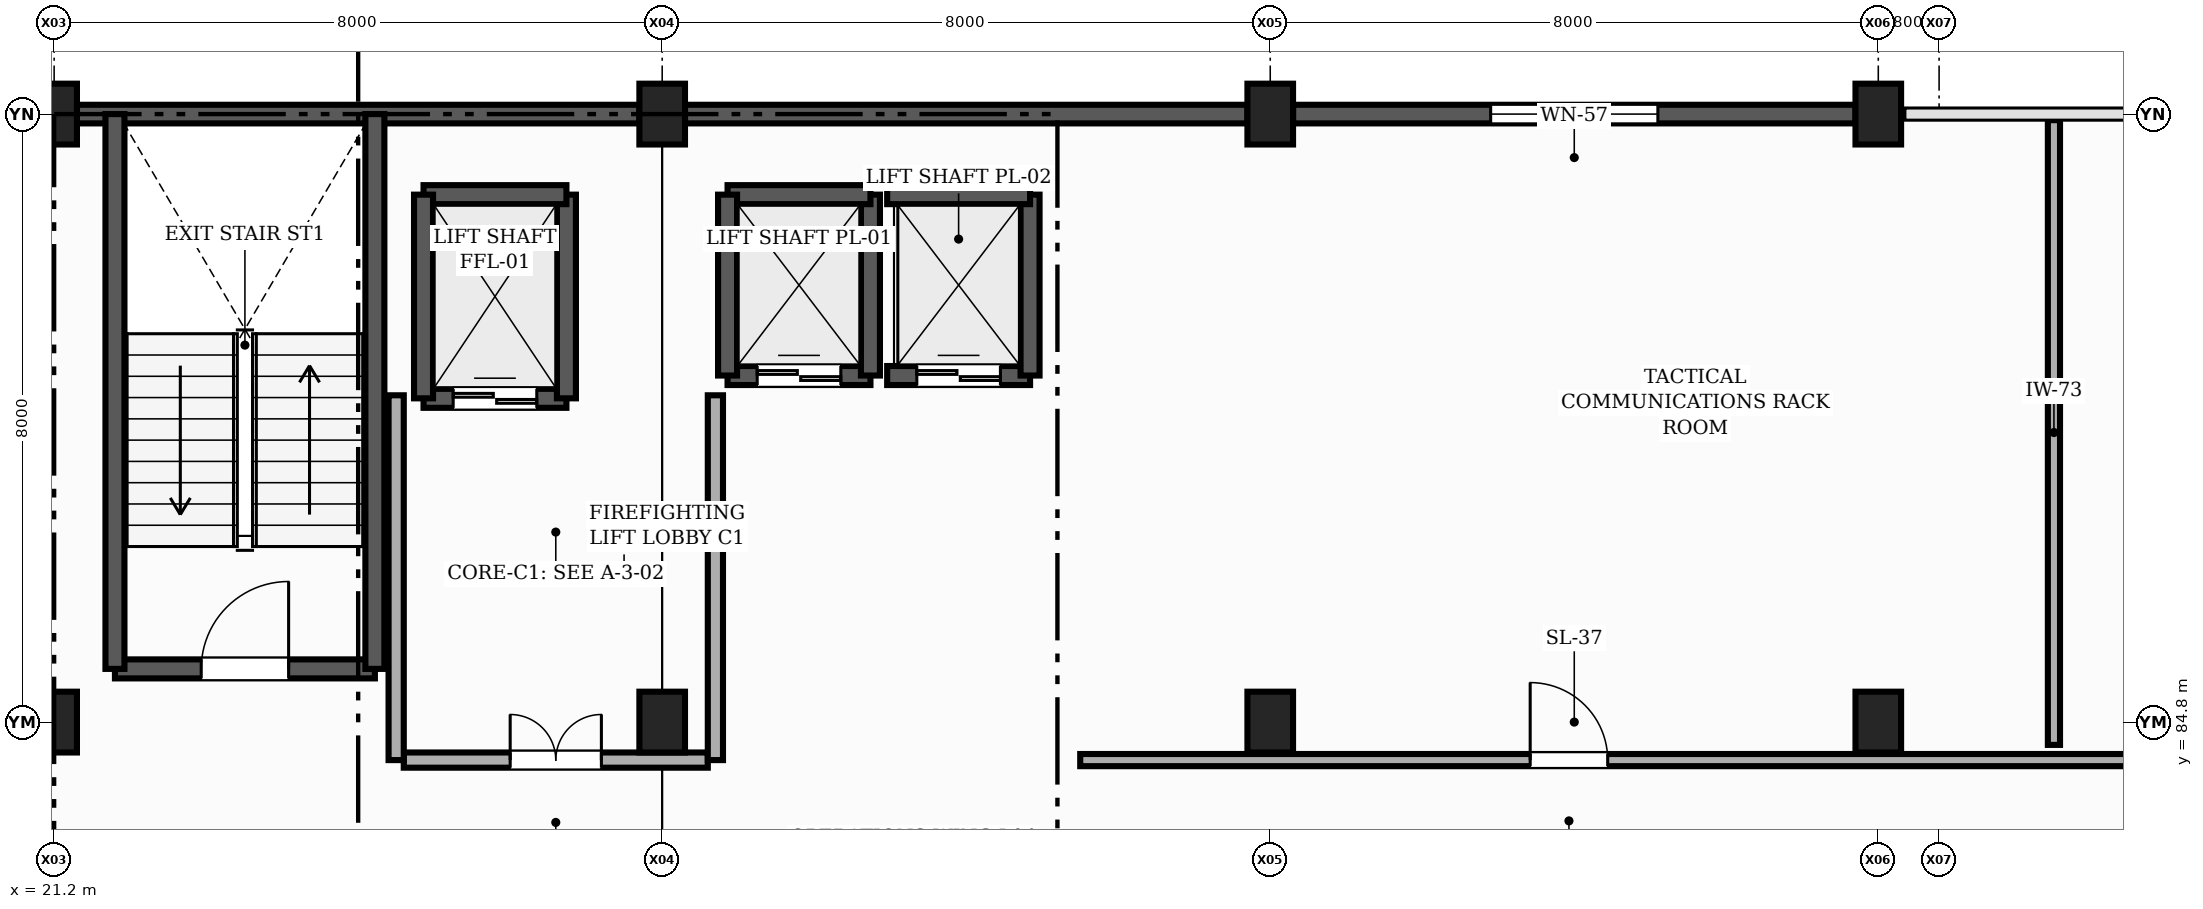
"""IFC4 building model, lengths in metres.
Left out: names, types, materials, properties, quantities, classifications, styles, units other than length and angle.
Written with IfcOpenShell. Run it as: python <this file> out.ifc"""

import sys

from ifc_helpers import new_model, si_unit, direction, frame, frame_2d, origin, origin_2d, place, context, subcontext, project, spatial, rectangle, extrude, element, fill, save


model = new_model("IFC4")
c1 = context("Model", 3, precision=1e-05, world=origin(), true_north=direction((0.0, 1.0)))
c2 = subcontext(c1, "Body", "Model", "MODEL_VIEW")
j1 = project(units=[si_unit("LENGTHUNIT", "METRE"), si_unit("PLANEANGLEUNIT", "RADIAN")], contexts=[c1])
p1 = place(None, origin())
s1 = spatial("IfcSite", under=j1, at=p1, CompositionType="ELEMENT")
p2 = place(p1, origin())
s2 = spatial("IfcBuilding", under=s1, at=p2, CompositionType="ELEMENT")
p3 = place(p2, frame((0.0, 0.0, 18.0)))
s3 = spatial("IfcBuildingStorey", under=s2, at=p3, CompositionType="ELEMENT", Elevation=18.0)
for number, where, z_axis, x_axis in (
    (1, (21.2, 84.8, 0.0), (0.0, 0.0, 1.0), (1.0, 0.0, 0.0)),
    (2, (21.2, 92.8, 0.0), (0.0, 0.0, 1.0), (1.0, 0.0, 0.0)),
    (3, (29.2, 84.8, 0.0), (0.0, 0.0, 1.0), (1.0, 0.0, 0.0)),
    (4, (29.2, 92.8, 0.0), (0.0, 0.0, 1.0), (1.0, 0.0, 0.0)),
    (5, (37.2, 84.8, 0.0), (0.0, 0.0, 1.0), (1.0, 0.0, 0.0)),
    (6, (37.2, 92.8, 0.0), (0.0, 0.0, 1.0), (1.0, 0.0, 0.0)),
    (7, (45.2, 84.8, 0.0), (0.0, 0.0, 1.0), (1.0, 0.0, 0.0)),
    (8, (45.2, 92.8, 0.0), (0.0, 0.0, 1.0), (1.0, 0.0, 0.0)),
):
    element("IfcColumn", number, at=place(p3, frame(where, z_axis=z_axis, x_axis=x_axis)), inside=s3, PredefinedType="COLUMN", context=c2, shape_type="SweptSolid", body=[
        extrude(rectangle(XDim=0.6, YDim=0.8, at=origin_2d()), origin(), (0.0, 0.0, 1.0), 3.9),
    ])
p4 = place(p3, frame((44.9, 92.8, 0.0), z_axis=(0.0, 0.0, 1.0), x_axis=(-1.0, 0.0, 0.0)))
e9 = element("IfcWall", 9, at=p4, inside=s3, PredefinedType="SOLIDWALL", context=c2, shape_type="SweptSolid", body=[
    extrude(rectangle(XDim=7.4, YDim=0.245, at=frame_2d((3.7, 0.0))), origin(), (0.0, 0.0, 1.0), 2.99),
])
p5 = place(p4, frame((2.6, 0.0, 0.9)))
e10 = element("IfcOpeningElement", 10, at=p5, cuts=e9, PredefinedType="OPENING", context=c2, shape_type="SweptSolid", body=[
    extrude(rectangle(XDim=2.2, YDim=1.6, at=frame_2d((1.1, 0.8))), frame((0.0, 0.133, 0.0), z_axis=(0.0, -1.0, 0.0), x_axis=(1.0, 0.0, 0.0)), (0.0, 0.0, 1.0), 0.265),
])
p6 = place(p3, frame((36.9, 92.8, 0.0), z_axis=(0.0, 0.0, 1.0), x_axis=(-1.0, 0.0, 0.0)))
e11 = element("IfcWall", 11, at=p6, inside=s3, PredefinedType="SOLIDWALL", context=c2, shape_type="SweptSolid", body=[
    extrude(rectangle(XDim=7.4, YDim=0.245, at=frame_2d((3.7, 0.0))), origin(), (0.0, 0.0, 1.0), 2.99),
])
p7 = place(p3, frame((28.9, 92.8, 0.0), z_axis=(0.0, 0.0, 1.0), x_axis=(-1.0, 0.0, 0.0)))
e12 = element("IfcWall", 12, at=p7, inside=s3, PredefinedType="SOLIDWALL", context=c2, shape_type="SweptSolid", body=[
    extrude(rectangle(XDim=7.4, YDim=0.245, at=frame_2d((3.7, 0.0))), origin(), (0.0, 0.0, 1.0), 3.64),
])
p8 = place(p3, frame((22.0, 85.5, 0.0), z_axis=(0.0, 0.0, 1.0), x_axis=(1.0, 0.0, 0.0)))
e13 = element("IfcWall", 13, at=p8, inside=s3, PredefinedType="SHEAR", context=c2, shape_type="SweptSolid", body=[
    extrude(rectangle(XDim=3.42, YDim=0.25, at=frame_2d((1.71, 0.0))), origin(), (0.0, 0.0, 1.0), 3.9),
])
p9 = place(p8, frame((1.135, 0.0, 0.0)))
e14 = element("IfcOpeningElement", 14, at=p9, cuts=e13, PredefinedType="OPENING", context=c2, shape_type="SweptSolid", body=[
    extrude(rectangle(XDim=1.15, YDim=2.15, at=frame_2d((0.575, 1.075))), frame((0.0, 0.135, 0.0), z_axis=(0.0, -1.0, 0.0), x_axis=(1.0, 0.0, 0.0)), (0.0, 0.0, 1.0), 0.27),
])
for number, where, z_axis, x_axis in (
    (15, (25.42, 85.5, 0.0), (0.0, 0.0, 1.0), (0.0, 1.0, 0.0)),
    (16, (22.0, 92.8, 0.0), (0.0, 0.0, 1.0), (0.0, -1.0, 0.0)),
):
    element("IfcWall", number, at=place(p3, frame(where, z_axis=z_axis, x_axis=x_axis)), inside=s3, PredefinedType="SHEAR", context=c2, shape_type="SweptSolid", body=[
        extrude(rectangle(XDim=7.3, YDim=0.25, at=frame_2d((3.65, 0.0))), origin(), (0.0, 0.0, 1.0), 3.9),
    ])
p10 = place(p3, frame((26.06, 89.06, 0.0), z_axis=(0.0, 0.0, 1.0), x_axis=(1.0, 0.0, 0.0)))
e17 = element("IfcWall", 17, at=p10, inside=s3, PredefinedType="SHEAR", context=c2, shape_type="SweptSolid", body=[
    extrude(rectangle(XDim=1.88, YDim=0.25, at=frame_2d((0.94, 0.0))), origin(), (0.0, 0.0, 1.0), 3.9),
])
p11 = place(p10, frame((0.39, 0.0, 0.0)))
e18 = element("IfcOpeningElement", 18, at=p11, cuts=e17, PredefinedType="OPENING", context=c2, shape_type="SweptSolid", body=[
    extrude(rectangle(XDim=1.1, YDim=2.2, at=frame_2d((0.55, 1.1))), frame((0.0, 0.135, 0.0), z_axis=(0.0, -1.0, 0.0), x_axis=(1.0, 0.0, 0.0)), (0.0, 0.0, 1.0), 0.27),
])
p12 = place(p3, frame((27.94, 89.06, 0.0), z_axis=(0.0, 0.0, 1.0), x_axis=(0.0, 1.0, 0.0)))
e19 = element("IfcWall", 19, at=p12, inside=s3, PredefinedType="SHEAR", context=c2, shape_type="SweptSolid", body=[
    extrude(rectangle(XDim=2.68, YDim=0.25, at=frame_2d((1.34, 0.0))), origin(), (0.0, 0.0, 1.0), 3.9),
])
p13 = place(p3, frame((27.94, 91.74, 0.0), z_axis=(0.0, 0.0, 1.0), x_axis=(-1.0, 0.0, 0.0)))
e20 = element("IfcWall", 20, at=p13, inside=s3, PredefinedType="SHEAR", context=c2, shape_type="SweptSolid", body=[
    extrude(rectangle(XDim=1.88, YDim=0.25, at=frame_2d((0.94, 0.0))), origin(), (0.0, 0.0, 1.0), 3.9),
])
p14 = place(p3, frame((26.06, 91.74, 0.0), z_axis=(0.0, 0.0, 1.0), x_axis=(0.0, -1.0, 0.0)))
e21 = element("IfcWall", 21, at=p14, inside=s3, PredefinedType="SHEAR", context=c2, shape_type="SweptSolid", body=[
    extrude(rectangle(XDim=2.68, YDim=0.25, at=frame_2d((1.34, 0.0))), origin(), (0.0, 0.0, 1.0), 3.9),
])
p15 = place(p3, frame((30.06, 89.36, 0.0), z_axis=(0.0, 0.0, 1.0), x_axis=(1.0, 0.0, 0.0)))
e22 = element("IfcWall", 22, at=p15, inside=s3, PredefinedType="SHEAR", context=c2, shape_type="SweptSolid", body=[
    extrude(rectangle(XDim=1.88, YDim=0.25, at=frame_2d((0.94, 0.0))), origin(), (0.0, 0.0, 1.0), 3.9),
])
p16 = place(p15, frame((0.39, 0.0, 0.0)))
e23 = element("IfcOpeningElement", 23, at=p16, cuts=e22, PredefinedType="OPENING", context=c2, shape_type="SweptSolid", body=[
    extrude(rectangle(XDim=1.1, YDim=2.2, at=frame_2d((0.55, 1.1))), frame((0.0, 0.135, 0.0), z_axis=(0.0, -1.0, 0.0), x_axis=(1.0, 0.0, 0.0)), (0.0, 0.0, 1.0), 0.27),
])
p17 = place(p3, frame((31.94, 89.36, 0.0), z_axis=(0.0, 0.0, 1.0), x_axis=(0.0, 1.0, 0.0)))
e24 = element("IfcWall", 24, at=p17, inside=s3, PredefinedType="SHEAR", context=c2, shape_type="SweptSolid", body=[
    extrude(rectangle(XDim=2.38, YDim=0.25, at=frame_2d((1.19, 0.0))), origin(), (0.0, 0.0, 1.0), 3.9),
])
p18 = place(p3, frame((31.94, 91.74, 0.0), z_axis=(0.0, 0.0, 1.0), x_axis=(-1.0, 0.0, 0.0)))
e25 = element("IfcWall", 25, at=p18, inside=s3, PredefinedType="SHEAR", context=c2, shape_type="SweptSolid", body=[
    extrude(rectangle(XDim=1.88, YDim=0.25, at=frame_2d((0.94, 0.0))), origin(), (0.0, 0.0, 1.0), 3.9),
])
p19 = place(p3, frame((30.06, 91.74, 0.0), z_axis=(0.0, 0.0, 1.0), x_axis=(0.0, -1.0, 0.0)))
e26 = element("IfcWall", 26, at=p19, inside=s3, PredefinedType="SHEAR", context=c2, shape_type="SweptSolid", body=[
    extrude(rectangle(XDim=2.38, YDim=0.25, at=frame_2d((1.19, 0.0))), origin(), (0.0, 0.0, 1.0), 3.9),
])
p20 = place(p3, frame((32.16, 89.36, 0.0), z_axis=(0.0, 0.0, 1.0), x_axis=(1.0, 0.0, 0.0)))
e27 = element("IfcWall", 27, at=p20, inside=s3, PredefinedType="SHEAR", context=c2, shape_type="SweptSolid", body=[
    extrude(rectangle(XDim=1.88, YDim=0.25, at=frame_2d((0.94, 0.0))), origin(), (0.0, 0.0, 1.0), 3.9),
])
p21 = place(p20, frame((0.39, 0.0, 0.0)))
e28 = element("IfcOpeningElement", 28, at=p21, cuts=e27, PredefinedType="OPENING", context=c2, shape_type="SweptSolid", body=[
    extrude(rectangle(XDim=1.1, YDim=2.2, at=frame_2d((0.55, 1.1))), frame((0.0, 0.135, 0.0), z_axis=(0.0, -1.0, 0.0), x_axis=(1.0, 0.0, 0.0)), (0.0, 0.0, 1.0), 0.27),
])
p22 = place(p3, frame((34.04, 89.36, 0.0), z_axis=(0.0, 0.0, 1.0), x_axis=(0.0, 1.0, 0.0)))
e29 = element("IfcWall", 29, at=p22, inside=s3, PredefinedType="SHEAR", context=c2, shape_type="SweptSolid", body=[
    extrude(rectangle(XDim=2.38, YDim=0.25, at=frame_2d((1.19, 0.0))), origin(), (0.0, 0.0, 1.0), 3.9),
])
p23 = place(p3, frame((34.04, 91.74, 0.0), z_axis=(0.0, 0.0, 1.0), x_axis=(-1.0, 0.0, 0.0)))
e30 = element("IfcWall", 30, at=p23, inside=s3, PredefinedType="SHEAR", context=c2, shape_type="SweptSolid", body=[
    extrude(rectangle(XDim=1.88, YDim=0.25, at=frame_2d((0.94, 0.0))), origin(), (0.0, 0.0, 1.0), 3.9),
])
p24 = place(p3, frame((25.8, 84.3, 0.0), z_axis=(0.0, 0.0, 1.0), x_axis=(1.0, 0.0, 0.0)))
e31 = element("IfcWall", 31, at=p24, inside=s3, PredefinedType="PARTITIONING", context=c2, shape_type="SweptSolid", body=[
    extrude(rectangle(XDim=4.0, YDim=0.2, at=frame_2d((2.0, 0.0))), origin(), (0.0, 0.0, 1.0), 3.075),
])
p25 = place(p24, frame((1.4, 0.0, 0.0)))
e32 = element("IfcOpeningElement", 32, at=p25, cuts=e31, PredefinedType="OPENING", context=c2, shape_type="SweptSolid", body=[
    extrude(rectangle(XDim=1.2, YDim=2.15, at=frame_2d((0.6, 1.075))), frame((0.0, 0.11, 0.0), z_axis=(0.0, -1.0, 0.0), x_axis=(1.0, 0.0, 0.0)), (0.0, 0.0, 1.0), 0.22),
])
p26 = place(p3, frame((25.7, 84.3, 0.0), z_axis=(0.0, 0.0, 1.0), x_axis=(0.0, 1.0, 0.0)))
e33 = element("IfcWall", 33, at=p26, inside=s3, PredefinedType="PARTITIONING", context=c2, shape_type="SweptSolid", body=[
    extrude(rectangle(XDim=4.8, YDim=0.2, at=frame_2d((2.4, 0.0))), origin(), (0.0, 0.0, 1.0), 2.925),
])
p27 = place(p3, frame((29.9, 84.3, 0.0), z_axis=(0.0, 0.0, 1.0), x_axis=(0.0, 1.0, 0.0)))
e34 = element("IfcWall", 34, at=p27, inside=s3, PredefinedType="PARTITIONING", context=c2, shape_type="SweptSolid", body=[
    extrude(rectangle(XDim=4.8, YDim=0.2, at=frame_2d((2.4, 0.0))), origin(), (0.0, 0.0, 1.0), 2.975),
])
p28 = place(p3, frame((47.511, 84.5, 0.0), z_axis=(0.0, 0.0, 1.0), x_axis=(0.0, 1.0, 0.0)))
e35 = element("IfcWall", 35, at=p28, inside=s3, PredefinedType="PARTITIONING", context=c2, shape_type="SweptSolid", body=[
    extrude(rectangle(XDim=8.22, YDim=0.16, at=frame_2d((4.11, 0.0))), origin(), (0.0, 0.0, 1.0), 2.975),
])
p29 = place(p3, frame((34.7, 84.3, 0.0), z_axis=(0.0, 0.0, 1.0), x_axis=(1.0, 0.0, 0.0)))
e36 = element("IfcWall", 36, at=p29, inside=s3, PredefinedType="PARTITIONING", context=c2, shape_type="SweptSolid", body=[
    extrude(rectangle(XDim=35.4, YDim=0.16, at=frame_2d((17.7, 0.0))), origin(), (0.0, 0.0, 1.0), 3.075),
])
p30 = place(p29, frame((5.92, 0.0, 0.0)))
e37 = element("IfcOpeningElement", 37, at=p30, cuts=e36, PredefinedType="OPENING", context=c2, shape_type="SweptSolid", body=[
    extrude(rectangle(XDim=1.02, YDim=2.12, at=frame_2d((0.51, 1.06))), frame((0.0, 0.09, 0.0), z_axis=(0.0, -1.0, 0.0), x_axis=(1.0, 0.0, 0.0)), (0.0, 0.0, 1.0), 0.18),
])
p31 = place(p29, frame((17.2, 0.0, 0.0)))
e38 = element("IfcOpeningElement", 38, at=p31, cuts=e36, PredefinedType="OPENING", context=c2, shape_type="SweptSolid", body=[
    extrude(rectangle(XDim=0.95, YDim=2.15, at=frame_2d((0.475, 1.075))), frame((0.0, 0.09, 0.0), z_axis=(0.0, -1.0, 0.0), x_axis=(1.0, 0.0, 0.0)), (0.0, 0.0, 1.0), 0.18),
])
p32 = place(p29, frame((28.48, 0.0, 0.0)))
e39 = element("IfcOpeningElement", 39, at=p32, cuts=e36, PredefinedType="OPENING", context=c2, shape_type="SweptSolid", body=[
    extrude(rectangle(XDim=1.08, YDim=2.14, at=frame_2d((0.54, 1.07))), frame((0.0, 0.09, 0.0), z_axis=(0.0, -1.0, 0.0), x_axis=(1.0, 0.0, 0.0)), (0.0, 0.0, 1.0), 0.18),
])
p33 = place(p5, origin())
e40 = element("IfcWindow", 40, at=p33, inside=s3, PartitioningType="SINGLE_PANEL", PredefinedType="WINDOW", context=c2, shape_type="SweptSolid", body=[
    extrude(rectangle(XDim=2.2, YDim=1.6, at=frame_2d((1.1, 0.8))), frame((0.0, 0.03, 0.0), z_axis=(0.0, -1.0, 0.0), x_axis=(1.0, 0.0, 0.0)), (0.0, 0.0, 1.0), 0.06),
])
fill(e10, e40)
p34 = place(p9, origin())
e41 = element("IfcDoor", 41, at=p34, inside=s3, OperationType="SINGLE_SWING_RIGHT", PredefinedType="DOOR", context=c2, shape_type="SweptSolid", body=[
    extrude(rectangle(XDim=1.15, YDim=2.15, at=frame_2d((0.575, 1.075))), frame((0.0, 0.025, 0.0), z_axis=(0.0, -1.0, 0.0), x_axis=(1.0, 0.0, 0.0)), (0.0, 0.0, 1.0), 0.05),
])
fill(e14, e41)
p35 = place(p11, origin())
e42 = element("IfcDoor", 42, at=p35, inside=s3, OperationType="DOUBLE_DOOR_SLIDING", PredefinedType="DOOR", context=c2, shape_type="SweptSolid", body=[
    extrude(rectangle(XDim=1.1, YDim=2.2, at=frame_2d((0.55, 1.1))), frame((0.0, 0.025, 0.0), z_axis=(0.0, -1.0, 0.0), x_axis=(1.0, 0.0, 0.0)), (0.0, 0.0, 1.0), 0.05),
])
fill(e18, e42)
p36 = place(p16, origin())
e43 = element("IfcDoor", 43, at=p36, inside=s3, OperationType="DOUBLE_DOOR_SLIDING", PredefinedType="DOOR", context=c2, shape_type="SweptSolid", body=[
    extrude(rectangle(XDim=1.1, YDim=2.2, at=frame_2d((0.55, 1.1))), frame((0.0, 0.025, 0.0), z_axis=(0.0, -1.0, 0.0), x_axis=(1.0, 0.0, 0.0)), (0.0, 0.0, 1.0), 0.05),
])
fill(e23, e43)
p37 = place(p21, origin())
e44 = element("IfcDoor", 44, at=p37, inside=s3, OperationType="DOUBLE_DOOR_SLIDING", PredefinedType="DOOR", context=c2, shape_type="SweptSolid", body=[
    extrude(rectangle(XDim=1.1, YDim=2.2, at=frame_2d((0.55, 1.1))), frame((0.0, 0.025, 0.0), z_axis=(0.0, -1.0, 0.0), x_axis=(1.0, 0.0, 0.0)), (0.0, 0.0, 1.0), 0.05),
])
fill(e28, e44)
p38 = place(p25, origin())
e45 = element("IfcDoor", 45, at=p38, inside=s3, OperationType="DOUBLE_DOOR_SINGLE_SWING", PredefinedType="DOOR", context=c2, shape_type="SweptSolid", body=[
    extrude(rectangle(XDim=1.2, YDim=2.15, at=frame_2d((0.6, 1.075))), frame((0.0, 0.025, 0.0), z_axis=(0.0, -1.0, 0.0), x_axis=(1.0, 0.0, 0.0)), (0.0, 0.0, 1.0), 0.05),
])
fill(e32, e45)
p39 = place(p30, origin())
e46 = element("IfcDoor", 46, at=p39, inside=s3, OperationType="SINGLE_SWING_LEFT", PredefinedType="DOOR", context=c2, shape_type="SweptSolid", body=[
    extrude(rectangle(XDim=1.02, YDim=2.12, at=frame_2d((0.51, 1.06))), frame((0.0, 0.025, 0.0), z_axis=(0.0, -1.0, 0.0), x_axis=(1.0, 0.0, 0.0)), (0.0, 0.0, 1.0), 0.05),
])
fill(e37, e46)
save(model, sys.argv[1])
